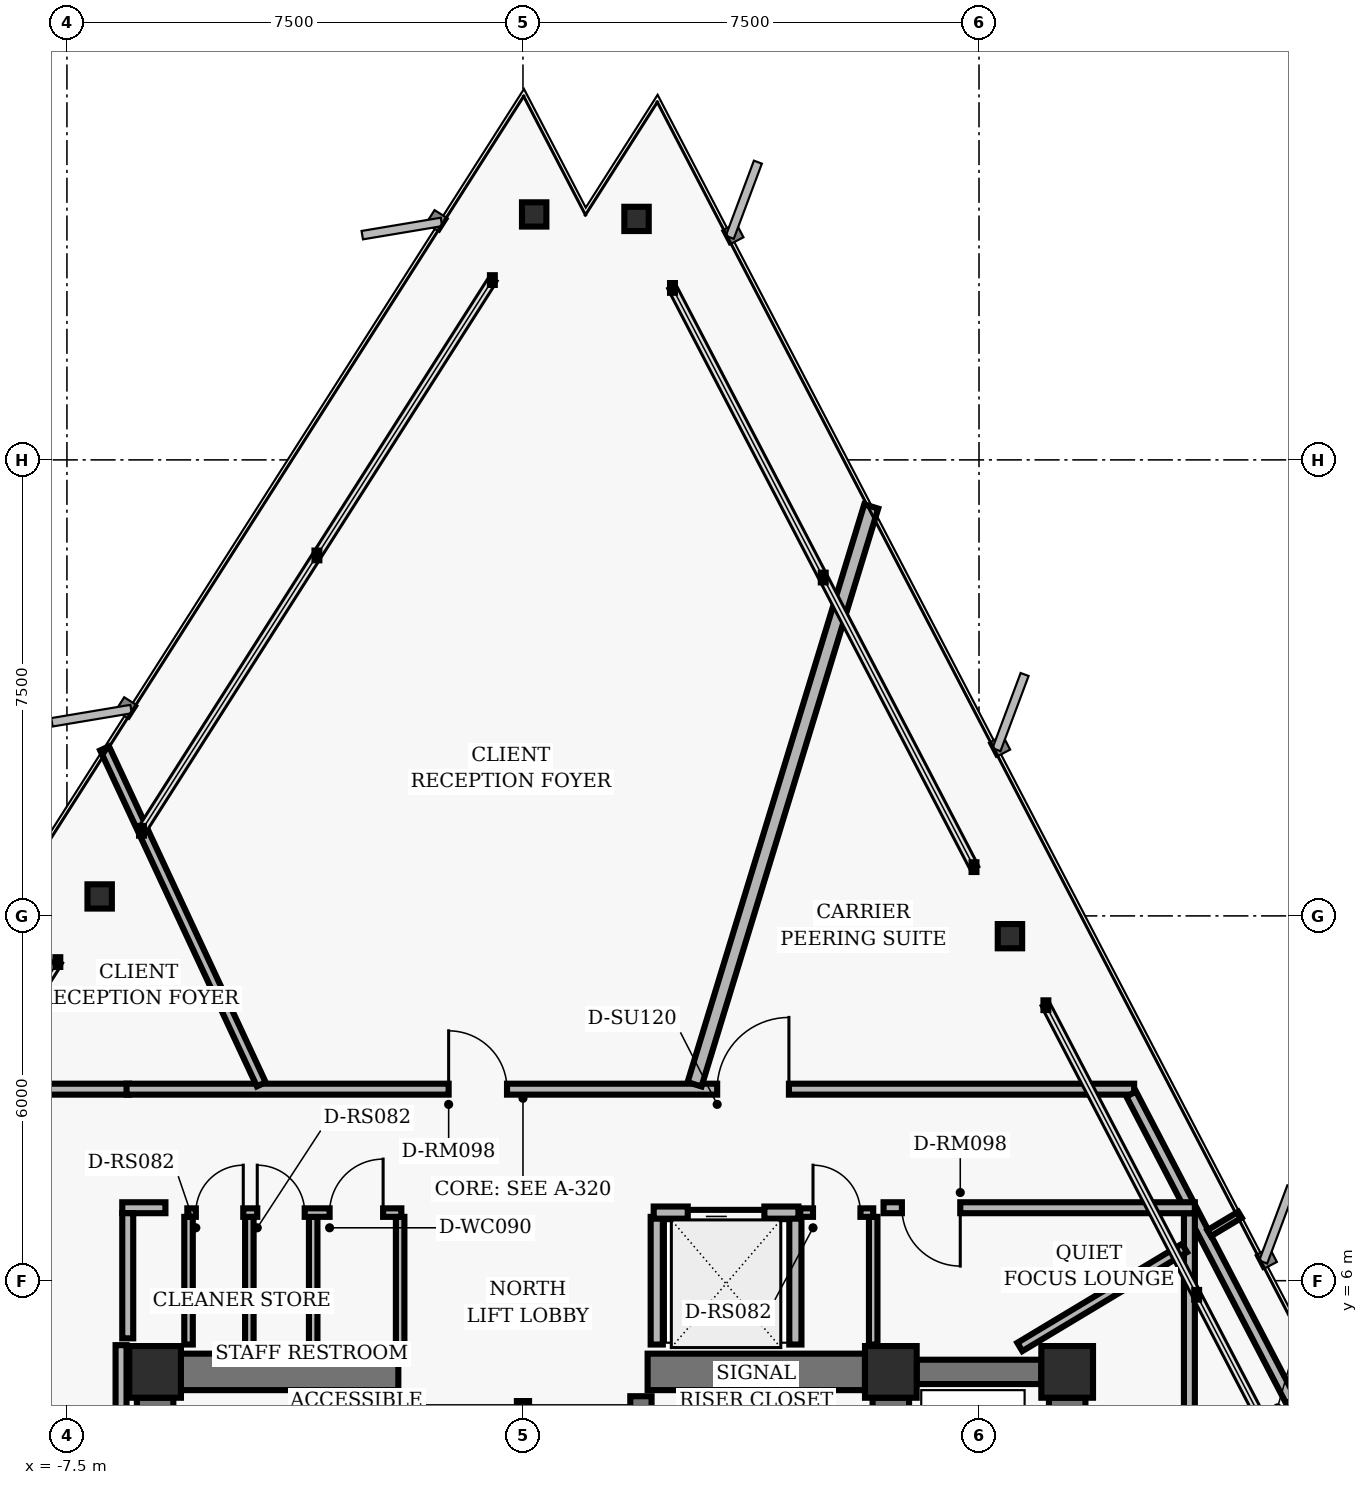
"""IFC4 building model, lengths in metres.
Left out: names, types, materials, properties, quantities, classifications, styles, units other than length and angle.
Written with IfcOpenShell. Run it as: python <this file> out.ifc"""

import sys

from ifc_helpers import new_model, si_unit, direction, frame, frame_2d, origin, origin_2d, place, context, subcontext, project, spatial, rectangle, hollow_rectangle, i_section, extrude, element, fill, save


model = new_model("IFC4")
c1 = context("Model", 3, precision=1e-05, world=origin(), true_north=direction((0.0, 1.0)))
c2 = subcontext(c1, "Body", "Model", "MODEL_VIEW")
j1 = project(units=[si_unit("LENGTHUNIT", "METRE"), si_unit("PLANEANGLEUNIT", "RADIAN")], contexts=[c1])
p1 = place(None, origin())
s1 = spatial("IfcSite", under=j1, at=p1, CompositionType="ELEMENT")
p2 = place(p1, origin())
s2 = spatial("IfcBuilding", under=s1, at=p2, CompositionType="ELEMENT")
p3 = place(p2, frame((0.0, 0.0, 144.16)))
s3 = spatial("IfcBuildingStorey", under=s2, at=p3, CompositionType="ELEMENT", Elevation=144.16)
for number, where, z_axis, x_axis in (
    (1, (-6.05, 4.5, 0.0), (0.0, 0.0, 1.0), (1.0, 0.0, 0.0)),
    (2, (6.05, 4.5, 0.0), (0.0, 0.0, 1.0), (1.0, 0.0, 0.0)),
    (3, (8.95, 4.5, 0.0), (0.0, 0.0, 1.0), (1.0, 0.0, 0.0)),
):
    element("IfcColumn", number, at=place(p3, frame(where, z_axis=z_axis, x_axis=x_axis)), inside=s3, PredefinedType="COLUMN", context=c2, shape_type="SweptSolid", body=[
        extrude(hollow_rectangle(XDim=0.85, YDim=0.85, WallThickness=0.055, InnerFilletRadius=0.02, OuterFilletRadius=0.04, at=origin_2d()), origin(), (0.0, 0.0, 1.0), 3.04),
    ])
for number, where, z_axis, x_axis in (
    (4, (-6.05, 0.425, 0.0), (0.0, 0.0, 1.0), (0.0, 1.0, 0.0)),
    (5, (6.05, 0.425, 0.0), (0.0, 0.0, 1.0), (0.0, 1.0, 0.0)),
):
    element("IfcWall", number, at=place(p3, frame(where, z_axis=z_axis, x_axis=x_axis)), inside=s3, PredefinedType="SHEAR", context=c2, shape_type="SweptSolid", body=[
        extrude(rectangle(XDim=3.65, YDim=0.6, at=frame_2d((1.825, 0.0))), origin(), (0.0, 0.0, 1.0), 2.618),
    ])
for number, where, z_axis, x_axis in (
    (6, (-1.94, -4.1, 0.0), (0.0, 0.0, 1.0), (0.0, 1.0, 0.0)),
    (7, (1.94, -4.1, 0.0), (0.0, 0.0, 1.0), (0.0, 1.0, 0.0)),
):
    element("IfcWall", number, at=place(p3, frame(where, z_axis=z_axis, x_axis=x_axis)), inside=s3, PredefinedType="SHEAR", context=c2, shape_type="SweptSolid", body=[
        extrude(rectangle(XDim=8.2, YDim=0.35, at=frame_2d((4.1, 0.0))), origin(), (0.0, 0.0, 1.0), 2.618),
    ])
for number, where, z_axis, x_axis in (
    (8, (-5.625, 4.5, 0.0), (0.0, 0.0, 1.0), (1.0, 0.0, 0.0)),
    (9, (2.05, 4.5, 0.0), (0.0, 0.0, 1.0), (1.0, 0.0, 0.0)),
):
    element("IfcWall", number, at=place(p3, frame(where, z_axis=z_axis, x_axis=x_axis)), inside=s3, PredefinedType="SHEAR", context=c2, shape_type="SweptSolid", body=[
        extrude(rectangle(XDim=3.575, YDim=0.6, at=frame_2d((1.788, 0.0))), origin(), (0.0, 0.0, 1.0), 2.618),
    ])
p4 = place(p3, frame((8.95, -3.875, 0.0), z_axis=(0.0, 0.0, 1.0), x_axis=(0.0, 1.0, 0.0)))
e10 = element("IfcWall", 10, at=p4, inside=s3, PredefinedType="SHEAR", context=c2, shape_type="SweptSolid", body=[
    extrude(rectangle(XDim=7.95, YDim=0.6, at=frame_2d((3.975, 0.0))), origin(), (0.0, 0.0, 1.0), 2.618),
])
p5 = place(p4, frame((0.55, 0.0, 0.0)))
e11 = element("IfcOpeningElement", 11, at=p5, cuts=e10, PredefinedType="OPENING", context=c2, shape_type="SweptSolid", body=[
    extrude(rectangle(XDim=1.06, YDim=2.04, at=frame_2d((0.53, 1.02))), frame((0.0, 0.31, 0.0), z_axis=(0.0, -1.0, 0.0), x_axis=(1.0, 0.0, 0.0)), (0.0, 0.0, 1.0), 0.62),
])
p6 = place(p4, frame((3.445, 0.0, 0.0)))
e12 = element("IfcOpeningElement", 12, at=p6, cuts=e10, PredefinedType="OPENING", context=c2, shape_type="SweptSolid", body=[
    extrude(rectangle(XDim=1.06, YDim=2.04, at=frame_2d((0.53, 1.02))), frame((0.0, 0.31, 0.0), z_axis=(0.0, -1.0, 0.0), x_axis=(1.0, 0.0, 0.0)), (0.0, 0.0, 1.0), 0.62),
])
p7 = place(p4, frame((6.33, 0.0, 0.0)))
e13 = element("IfcOpeningElement", 13, at=p7, cuts=e10, PredefinedType="OPENING", context=c2, shape_type="SweptSolid", body=[
    extrude(rectangle(XDim=1.06, YDim=2.04, at=frame_2d((0.53, 1.02))), frame((0.0, 0.31, 0.0), z_axis=(0.0, -1.0, 0.0), x_axis=(1.0, 0.0, 0.0)), (0.0, 0.0, 1.0), 0.62),
])
p8 = place(p3, frame((6.475, 4.5, 0.0), z_axis=(0.0, 0.0, 1.0), x_axis=(1.0, 0.0, 0.0)))
e14 = element("IfcWall", 14, at=p8, inside=s3, PredefinedType="SHEAR", context=c2, shape_type="SweptSolid", body=[
    extrude(rectangle(XDim=2.05, YDim=0.4, at=frame_2d((1.025, 0.0))), origin(), (0.0, 0.0, 1.0), 2.618),
])
for number, where, z_axis, x_axis in (
    (15, (8.009, 11.666, 0.0), (0.0, 0.0, 1.0), (1.0, 0.0, 0.0)),
    (16, (1.868, 23.463, 0.0), (0.0, 0.0, 1.0), (1.0, 0.0, 0.0)),
    (17, (0.184, 23.537, 0.0), (0.0, 0.0, 1.0), (1.0, 0.0, 0.0)),
    (18, (-6.962, 12.32, 0.0), (0.0, 0.0, 1.0), (1.0, 0.0, 0.0)),
):
    element("IfcColumn", number, at=place(p3, frame(where, z_axis=z_axis, x_axis=x_axis)), inside=s3, PredefinedType="COLUMN", context=c2, shape_type="SweptSolid", body=[
        extrude(i_section(OverallWidth=0.401, OverallDepth=0.399, WebThickness=0.025, FlangeThickness=0.04, FilletRadius=0.018, at=origin_2d()), origin(), (0.0, 0.0, 1.0), 3.04),
    ])
p9 = place(p3, frame((0.0, 1.25, 0.0), z_axis=(0.0, 0.0, 1.0), x_axis=(0.0, 1.0, 0.0)))
e19 = element("IfcWall", 19, at=p9, inside=s3, PredefinedType="PARTITIONING", context=c2, shape_type="SweptSolid", body=[
    extrude(rectangle(XDim=2.77, YDim=0.2, at=frame_2d((1.385, 0.0))), origin(), (0.0, 0.0, 1.0), 2.593),
])
for number, where, z_axis, x_axis in (
    (20, (2.2, 4.95, 0.0), (0.0, 0.0, 1.0), (0.0, 1.0, 0.0)),
    (21, (4.48, 4.95, 0.0), (0.0, 0.0, 1.0), (0.0, 1.0, 0.0)),
):
    element("IfcWall", number, at=place(p3, frame(where, z_axis=z_axis, x_axis=x_axis)), inside=s3, PredefinedType="PARTITIONING", context=c2, shape_type="SweptSolid", body=[
        extrude(rectangle(XDim=2.1, YDim=0.2, at=frame_2d((1.05, 0.0))), origin(), (0.0, 0.0, 1.0), 2.593),
    ])
p10 = place(p3, frame((2.15, 7.12, 0.0), z_axis=(0.0, 0.0, 1.0), x_axis=(1.0, 0.0, 0.0)))
e22 = element("IfcWall", 22, at=p10, inside=s3, PredefinedType="PARTITIONING", context=c2, shape_type="SweptSolid", body=[
    extrude(rectangle(XDim=2.38, YDim=0.2, at=frame_2d((1.19, 0.0))), origin(), (0.0, 0.0, 1.0), 2.593),
])
p11 = place(p10, frame((0.56, 0.0, 0.0)))
e23 = element("IfcOpeningElement", 23, at=p11, cuts=e22, PredefinedType="OPENING", context=c2, shape_type="SweptSolid", body=[
    extrude(rectangle(XDim=1.26, YDim=2.06, at=frame_2d((0.63, 1.03))), frame((0.0, 0.11, 0.0), z_axis=(0.0, -1.0, 0.0), x_axis=(1.0, 0.0, 0.0)), (0.0, 0.0, 1.0), 0.22),
])
for number, where, z_axis, x_axis in (
    (24, (-5.5, 4.95, 0.0), (0.0, 0.0, 1.0), (0.0, 1.0, 0.0)),
    (25, (-4.5, 4.95, 0.0), (0.0, 0.0, 1.0), (0.0, 1.0, 0.0)),
    (26, (-3.45, 4.95, 0.0), (0.0, 0.0, 1.0), (0.0, 1.0, 0.0)),
    (27, (-2.02, 4.95, 0.0), (0.0, 0.0, 1.0), (0.0, 1.0, 0.0)),
):
    element("IfcWall", number, at=place(p3, frame(where, z_axis=z_axis, x_axis=x_axis)), inside=s3, PredefinedType="PARTITIONING", context=c2, shape_type="SweptSolid", body=[
        extrude(rectangle(XDim=2.1, YDim=0.14, at=frame_2d((1.05, 0.0))), origin(), (0.0, 0.0, 1.0), 2.593),
    ])
p12 = place(p3, frame((-5.52, 7.12, 0.0), z_axis=(0.0, 0.0, 1.0), x_axis=(1.0, 0.0, 0.0)))
e28 = element("IfcWall", 28, at=p12, inside=s3, PredefinedType="PARTITIONING", context=c2, shape_type="SweptSolid", body=[
    extrude(rectangle(XDim=3.52, YDim=0.14, at=frame_2d((1.76, 0.0))), origin(), (0.0, 0.0, 1.0), 2.16),
])
p13 = place(p12, frame((0.14, 0.0, 0.0)))
e29 = element("IfcOpeningElement", 29, at=p13, cuts=e28, PredefinedType="OPENING", context=c2, shape_type="SweptSolid", body=[
    extrude(rectangle(XDim=0.78, YDim=2.01, at=frame_2d((0.39, 1.005))), frame((0.0, 0.08, 0.0), z_axis=(0.0, -1.0, 0.0), x_axis=(1.0, 0.0, 0.0)), (0.0, 0.0, 1.0), 0.16),
])
p14 = place(p12, frame((1.15, 0.0, 0.0)))
e30 = element("IfcOpeningElement", 30, at=p14, cuts=e28, PredefinedType="OPENING", context=c2, shape_type="SweptSolid", body=[
    extrude(rectangle(XDim=0.78, YDim=2.01, at=frame_2d((0.39, 1.005))), frame((0.0, 0.08, 0.0), z_axis=(0.0, -1.0, 0.0), x_axis=(1.0, 0.0, 0.0)), (0.0, 0.0, 1.0), 0.16),
])
p15 = place(p12, frame((2.34, 0.0, 0.0)))
e31 = element("IfcOpeningElement", 31, at=p15, cuts=e28, PredefinedType="OPENING", context=c2, shape_type="SweptSolid", body=[
    extrude(rectangle(XDim=0.88, YDim=2.02, at=frame_2d((0.44, 1.01))), frame((0.0, 0.08, 0.0), z_axis=(0.0, -1.0, 0.0), x_axis=(1.0, 0.0, 0.0)), (0.0, 0.0, 1.0), 0.16),
])
p16 = place(p3, frame((5.76, 4.95, 0.0), z_axis=(0.0, 0.0, 1.0), x_axis=(0.0, 1.0, 0.0)))
e32 = element("IfcWall", 32, at=p16, inside=s3, PredefinedType="PARTITIONING", context=c2, shape_type="SweptSolid", body=[
    extrude(rectangle(XDim=2.1, YDim=0.14, at=frame_2d((1.05, 0.0))), origin(), (0.0, 0.0, 1.0), 2.593),
])
p17 = place(p3, frame((4.56, 7.12, 0.0), z_axis=(0.0, 0.0, 1.0), x_axis=(1.0, 0.0, 0.0)))
e33 = element("IfcWall", 33, at=p17, inside=s3, PredefinedType="PARTITIONING", context=c2, shape_type="SweptSolid", body=[
    extrude(rectangle(XDim=1.2, YDim=0.14, at=frame_2d((0.6, 0.0))), origin(), (0.0, 0.0, 1.0), 2.593),
])
p18 = place(p17, frame((0.21, 0.0, 0.0)))
e34 = element("IfcOpeningElement", 34, at=p18, cuts=e33, PredefinedType="OPENING", context=c2, shape_type="SweptSolid", body=[
    extrude(rectangle(XDim=0.78, YDim=2.01, at=frame_2d((0.39, 1.005))), frame((0.0, 0.08, 0.0), z_axis=(0.0, -1.0, 0.0), x_axis=(1.0, 0.0, 0.0)), (0.0, 0.0, 1.0), 0.16),
])
p19 = place(p3, frame((-8.34, 9.15, 0.0), z_axis=(0.0, 0.0, 1.0), x_axis=(1.0, 0.0, 0.0)))
e35 = element("IfcWall", 35, at=p19, inside=s3, PredefinedType="PARTITIONING", context=c2, shape_type="SweptSolid", body=[
    extrude(rectangle(XDim=1.86, YDim=0.18, at=frame_2d((0.93, 0.0))), origin(), (0.0, 0.0, 1.0), 2.593),
])
p20 = place(p3, frame((-6.52, 9.15, 0.0), z_axis=(0.0, 0.0, 1.0), x_axis=(1.0, 0.0, 0.0)))
e36 = element("IfcWall", 36, at=p20, inside=s3, PredefinedType="PARTITIONING", context=c2, shape_type="SweptSolid", body=[
    extrude(rectangle(XDim=16.572, YDim=0.18, at=frame_2d((8.286, 0.0))), origin(), (0.0, 0.0, 1.0), 2.16),
])
p21 = place(p20, frame((9.714, 0.0, 0.0)))
e37 = element("IfcOpeningElement", 37, at=p21, cuts=e36, PredefinedType="OPENING", context=c2, shape_type="SweptSolid", body=[
    extrude(rectangle(XDim=1.18, YDim=2.02, at=frame_2d((0.59, 1.01))), frame((0.0, 0.1, 0.0), z_axis=(0.0, -1.0, 0.0), x_axis=(1.0, 0.0, 0.0)), (0.0, 0.0, 1.0), 0.2),
])
p22 = place(p20, frame((5.298, 0.0, 0.0)))
e38 = element("IfcOpeningElement", 38, at=p22, cuts=e36, PredefinedType="OPENING", context=c2, shape_type="SweptSolid", body=[
    extrude(rectangle(XDim=0.96, YDim=2.02, at=frame_2d((0.48, 1.01))), frame((0.0, 0.1, 0.0), z_axis=(0.0, -1.0, 0.0), x_axis=(1.0, 0.0, 0.0)), (0.0, 0.0, 1.0), 0.2),
])
p23 = place(p3, frame((10.003, 9.07, 0.0), z_axis=(0.0, 0.0, 1.0), x_axis=(0.461740291408, -0.887015165198, 0.0)))
e39 = element("IfcWall", 39, at=p23, inside=s3, PredefinedType="PARTITIONING", context=c2, shape_type="SweptSolid", body=[
    extrude(rectangle(XDim=9.976, YDim=0.18, at=frame_2d((4.988, 0.0))), origin(), (0.0, 0.0, 1.0), 2.593),
])
p24 = place(p23, frame((5.689, 0.0, 0.0)))
e40 = element("IfcOpeningElement", 40, at=p24, cuts=e39, PredefinedType="OPENING", context=c2, shape_type="SweptSolid", body=[
    extrude(rectangle(XDim=0.96, YDim=2.02, at=frame_2d((0.48, 1.01))), frame((0.0, 0.1, 0.0), z_axis=(0.0, -1.0, 0.0), x_axis=(1.0, 0.0, 0.0)), (0.0, 0.0, 1.0), 0.2),
])
p25 = place(p3, frame((10.96, 3.84, 0.0), z_axis=(0.0, 0.0, 1.0), x_axis=(0.0, 1.0, 0.0)))
e41 = element("IfcWall", 41, at=p25, inside=s3, PredefinedType="PARTITIONING", context=c2, shape_type="SweptSolid", body=[
    extrude(rectangle(XDim=3.271, YDim=0.18, at=frame_2d((1.635, 0.0))), origin(), (0.0, 0.0, 1.0), 2.593),
])
p26 = place(p3, frame((11.05, 7.2, 0.0), z_axis=(0.0, 0.0, 1.0), x_axis=(-1.0, 0.0, 0.0)))
e42 = element("IfcWall", 42, at=p26, inside=s3, PredefinedType="PARTITIONING", context=c2, shape_type="SweptSolid", body=[
    extrude(rectangle(XDim=5.12, YDim=0.18, at=frame_2d((2.56, 0.0))), origin(), (0.0, 0.0, 1.0), 2.593),
])
p27 = place(p26, frame((3.858, 0.0, 0.0)))
e43 = element("IfcOpeningElement", 43, at=p27, cuts=e42, PredefinedType="OPENING", context=c2, shape_type="SweptSolid", body=[
    extrude(rectangle(XDim=0.96, YDim=2.02, at=frame_2d((0.48, 1.01))), frame((0.0, 0.1, 0.0), z_axis=(0.0, -1.0, 0.0), x_axis=(1.0, 0.0, 0.0)), (0.0, 0.0, 1.0), 0.2),
])
p28 = place(p3, frame((-5.88, 7.2, 0.0), z_axis=(0.0, 0.0, 1.0), x_axis=(-1.0, 0.0, 0.0)))
e44 = element("IfcWall", 44, at=p28, inside=s3, PredefinedType="PARTITIONING", context=c2, shape_type="SweptSolid", body=[
    extrude(rectangle(XDim=0.71, YDim=0.18, at=frame_2d((0.355, 0.0))), origin(), (0.0, 0.0, 1.0), 2.16),
])
p29 = place(p3, frame((-6.5, 7.11, 0.0), z_axis=(0.0, 0.0, 1.0), x_axis=(0.0, -1.0, 0.0)))
e45 = element("IfcWall", 45, at=p29, inside=s3, PredefinedType="PARTITIONING", context=c2, shape_type="SweptSolid", body=[
    extrude(rectangle(XDim=2.058, YDim=0.18, at=frame_2d((1.029, 0.0))), origin(), (0.0, 0.0, 1.0), 1.962),
])
p30 = place(p3, frame((-6.61, 4.94, 0.0), z_axis=(0.0, 0.0, 1.0), x_axis=(0.0, -1.0, 0.0)))
e46 = element("IfcWall", 46, at=p30, inside=s3, PredefinedType="PARTITIONING", context=c2, shape_type="SweptSolid", body=[
    extrude(rectangle(XDim=9.46, YDim=0.18, at=frame_2d((4.73, 0.0))), origin(), (0.0, 0.0, 1.0), 2.593),
])
p31 = place(p3, frame((8.172, 4.91, 0.0), z_axis=(0.0, 0.0, 1.0), x_axis=(0.857145019385, 0.515075155433, 0.0)))
e47 = element("IfcWall", 47, at=p31, inside=s3, PredefinedType="PARTITIONING", context=c2, shape_type="SweptSolid", body=[
    extrude(rectangle(XDim=3.16, YDim=0.16, at=frame_2d((1.58, 0.0))), origin(), (0.0, 0.0, 1.0), 2.593),
])
p32 = place(p3, frame((11.285, 6.781, 0.0), z_axis=(0.0, 0.0, 1.0), x_axis=(0.857237776814, 0.514920764782, 0.0)))
e48 = element("IfcWall", 48, at=p32, inside=s3, PredefinedType="MOVABLE", context=c2, shape_type="SweptSolid", body=[
    extrude(rectangle(XDim=0.591, YDim=0.115, at=frame_2d((0.296, 0.0))), origin(), (0.0, 0.0, 1.0), 2.593),
])
p33 = place(p3, frame((2.822, 9.23, 0.0), z_axis=(0.0, 0.0, 1.0), x_axis=(0.292353963616, 0.956310179784, 0.0)))
e49 = element("IfcWall", 49, at=p33, inside=s3, PredefinedType="PARTITIONING", context=c2, shape_type="SweptSolid", body=[
    extrude(rectangle(XDim=9.938, YDim=0.24, at=frame_2d((4.969, 0.0))), origin(), (0.0, 0.0, 1.0), 2.593),
])
p34 = place(p3, frame((-4.304, 9.23, 0.0), z_axis=(0.0, 0.0, 1.0), x_axis=(-0.422635533016, 0.906299733108, 0.0)))
e50 = element("IfcWall", 50, at=p34, inside=s3, PredefinedType="PARTITIONING", context=c2, shape_type="SweptSolid", body=[
    extrude(rectangle(XDim=6.097, YDim=0.16, at=frame_2d((3.048, 0.0))), origin(), (0.0, 0.0, 1.0), 2.593),
])
p35 = place(p11, origin())
e51 = element("IfcDoor", 51, at=p35, inside=s3, OperationType="SLIDING_TO_LEFT", PredefinedType="DOOR", context=c2, shape_type="SweptSolid", body=[
    extrude(rectangle(XDim=1.26, YDim=2.06, at=frame_2d((0.63, 1.03))), frame((0.0, 0.025, 0.0), z_axis=(0.0, -1.0, 0.0), x_axis=(1.0, 0.0, 0.0)), (0.0, 0.0, 1.0), 0.05),
])
fill(e23, e51)
p36 = place(p13, origin())
e52 = element("IfcDoor", 52, at=p36, inside=s3, OperationType="SINGLE_SWING_RIGHT", PredefinedType="DOOR", context=c2, shape_type="SweptSolid", body=[
    extrude(rectangle(XDim=0.78, YDim=2.01, at=frame_2d((0.39, 1.005))), frame((0.0, 0.025, 0.0), z_axis=(0.0, -1.0, 0.0), x_axis=(1.0, 0.0, 0.0)), (0.0, 0.0, 1.0), 0.05),
])
fill(e29, e52)
p37 = place(p14, origin())
e53 = element("IfcDoor", 53, at=p37, inside=s3, OperationType="SINGLE_SWING_LEFT", PredefinedType="DOOR", context=c2, shape_type="SweptSolid", body=[
    extrude(rectangle(XDim=0.78, YDim=2.01, at=frame_2d((0.39, 1.005))), frame((0.0, 0.025, 0.0), z_axis=(0.0, -1.0, 0.0), x_axis=(1.0, 0.0, 0.0)), (0.0, 0.0, 1.0), 0.05),
])
fill(e30, e53)
p38 = place(p15, origin())
e54 = element("IfcDoor", 54, at=p38, inside=s3, OperationType="SINGLE_SWING_RIGHT", PredefinedType="DOOR", context=c2, shape_type="SweptSolid", body=[
    extrude(rectangle(XDim=0.88, YDim=2.02, at=frame_2d((0.44, 1.01))), frame((0.0, 0.025, 0.0), z_axis=(0.0, -1.0, 0.0), x_axis=(1.0, 0.0, 0.0)), (0.0, 0.0, 1.0), 0.05),
])
fill(e31, e54)
p39 = place(p18, origin())
e55 = element("IfcDoor", 55, at=p39, inside=s3, OperationType="SINGLE_SWING_LEFT", PredefinedType="DOOR", context=c2, shape_type="SweptSolid", body=[
    extrude(rectangle(XDim=0.78, YDim=2.01, at=frame_2d((0.39, 1.005))), frame((0.0, 0.025, 0.0), z_axis=(0.0, -1.0, 0.0), x_axis=(1.0, 0.0, 0.0)), (0.0, 0.0, 1.0), 0.05),
])
fill(e34, e55)
p40 = place(p27, origin())
e56 = element("IfcDoor", 56, at=p40, inside=s3, OperationType="SINGLE_SWING_LEFT", PredefinedType="DOOR", context=c2, shape_type="SweptSolid", body=[
    extrude(rectangle(XDim=0.96, YDim=2.02, at=frame_2d((0.48, 1.01))), frame((0.0, 0.025, 0.0), z_axis=(0.0, -1.0, 0.0), x_axis=(1.0, 0.0, 0.0)), (0.0, 0.0, 1.0), 0.05),
])
fill(e43, e56)
p41 = place(p21, origin())
e57 = element("IfcDoor", 57, at=p41, inside=s3, OperationType="SINGLE_SWING_RIGHT", PredefinedType="DOOR", context=c2, shape_type="SweptSolid", body=[
    extrude(rectangle(XDim=1.18, YDim=2.02, at=frame_2d((0.59, 1.01))), frame((0.0, 0.025, 0.0), z_axis=(0.0, -1.0, 0.0), x_axis=(1.0, 0.0, 0.0)), (0.0, 0.0, 1.0), 0.05),
])
fill(e37, e57)
p42 = place(p22, origin())
e58 = element("IfcDoor", 58, at=p42, inside=s3, OperationType="SINGLE_SWING_LEFT", PredefinedType="DOOR", context=c2, shape_type="SweptSolid", body=[
    extrude(rectangle(XDim=0.96, YDim=2.02, at=frame_2d((0.48, 1.01))), frame((0.0, 0.025, 0.0), z_axis=(0.0, -1.0, 0.0), x_axis=(1.0, 0.0, 0.0)), (0.0, 0.0, 1.0), 0.05),
])
fill(e38, e58)
save(model, sys.argv[1])
